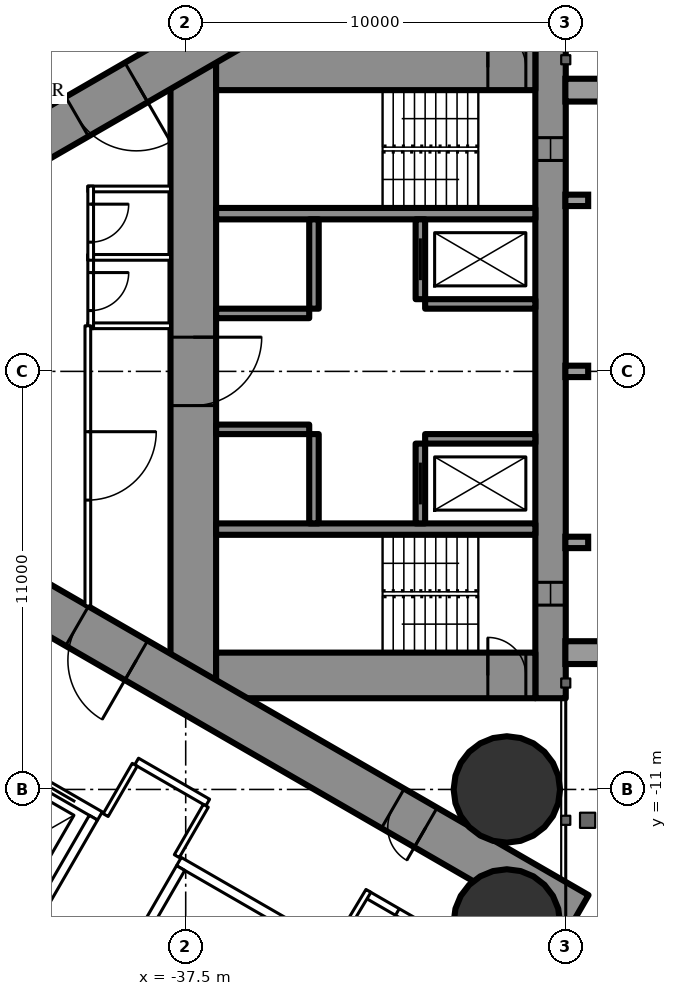
"""IFC4 building model, lengths in metres.
Left out: names, types, materials, properties, quantities, classifications, styles, units other than length and angle.
Written with IfcOpenShell. Run it as: python <this file> out.ifc"""

import sys

from ifc_helpers import new_model, si_unit, direction, frame, frame_2d, origin, origin_2d, place, context, subcontext, project, spatial, rectangle, circle, extrude, element, fill, save


model = new_model("IFC4")
c1 = context("Model", 3, precision=1e-05, world=origin(), true_north=direction((0.0, 1.0)))
c2 = subcontext(c1, "Body", "Model", "MODEL_VIEW")
j1 = project(units=[si_unit("LENGTHUNIT", "METRE"), si_unit("PLANEANGLEUNIT", "RADIAN")], contexts=[c1])
p1 = place(None, origin())
s1 = spatial("IfcSite", under=j1, at=p1, CompositionType="ELEMENT")
p2 = place(p1, origin())
s2 = spatial("IfcBuilding", under=s1, at=p2, CompositionType="ELEMENT")
p3 = place(p2, frame((0.0, 0.0, 159.8)))
s3 = spatial("IfcBuildingStorey", under=s2, at=p3, CompositionType="ELEMENT", Elevation=159.8)
for number, where, z_axis, x_axis in (
    (1, (-29.05, -11.0, 0.0), (0.0, 0.0, 1.0), (1.0, 0.0, 0.0)),
    (2, (-29.05, -14.5, 0.0), (0.0, 0.0, 1.0), (1.0, 0.0, 0.0)),
):
    element("IfcColumn", number, at=place(p3, frame(where, z_axis=z_axis, x_axis=x_axis)), inside=s3, PredefinedType="COLUMN", context=c2, shape_type="SweptSolid", body=[
        extrude(circle(Radius=1.4, at=origin_2d()), origin(), (0.0, 0.0, 1.0), 3.5),
    ])
p4 = place(p3, frame((-27.9, 8.6, 0.0), z_axis=(0.0, 0.0, 1.0), x_axis=(0.0, -1.0, 0.0)))
e3 = element("IfcWall", 3, at=p4, inside=s3, PredefinedType="SHEAR", context=c2, shape_type="SweptSolid", body=[
    extrude(rectangle(XDim=17.2, YDim=0.8, at=frame_2d((8.6, 0.0))), origin(), (0.0, 0.0, 1.0), 3.5),
])
p5 = place(p4, frame((2.45, 0.0, 0.6)))
e4 = element("IfcOpeningElement", 4, at=p5, cuts=e3, PredefinedType="OPENING", context=c2, shape_type="SweptSolid", body=[
    extrude(rectangle(XDim=0.6, YDim=2.1, at=frame_2d((0.3, 1.05))), frame((0.0, 0.41, 0.0), z_axis=(0.0, -1.0, 0.0), x_axis=(1.0, 0.0, 0.0)), (0.0, 0.0, 1.0), 0.82),
])
p6 = place(p4, frame((14.15, 0.0, 0.6)))
e5 = element("IfcOpeningElement", 5, at=p6, cuts=e3, PredefinedType="OPENING", context=c2, shape_type="SweptSolid", body=[
    extrude(rectangle(XDim=0.6, YDim=2.1, at=frame_2d((0.3, 1.05))), frame((0.0, 0.41, 0.0), z_axis=(0.0, -1.0, 0.0), x_axis=(1.0, 0.0, 0.0)), (0.0, 0.0, 1.0), 0.82),
])
p7 = place(p3, frame((-37.3, 8.6, 0.0), z_axis=(0.0, 0.0, 1.0), x_axis=(0.0, -1.0, 0.0)))
e6 = element("IfcWall", 6, at=p7, inside=s3, PredefinedType="SHEAR", context=c2, shape_type="SweptSolid", body=[
    extrude(rectangle(XDim=17.2, YDim=1.2, at=frame_2d((8.6, 0.0))), origin(), (0.0, 0.0, 1.0), 3.5),
])
p8 = place(p7, frame((7.7, 0.0, 0.0)))
e7 = element("IfcOpeningElement", 7, at=p8, cuts=e6, PredefinedType="OPENING", context=c2, shape_type="SweptSolid", body=[
    extrude(rectangle(XDim=1.8, YDim=2.2, at=frame_2d((0.9, 1.1))), frame((0.0, 0.61, 0.0), z_axis=(0.0, -1.0, 0.0), x_axis=(1.0, 0.0, 0.0)), (0.0, 0.0, 1.0), 1.22),
])
p9 = place(p3, frame((-28.3, 8.0, 0.0), z_axis=(0.0, 0.0, 1.0), x_axis=(-1.0, 0.0, 0.0)))
e8 = element("IfcWall", 8, at=p9, inside=s3, PredefinedType="SHEAR", context=c2, shape_type="SweptSolid", body=[
    extrude(rectangle(XDim=8.4, YDim=1.2, at=frame_2d((4.2, 0.0))), origin(), (0.0, 0.0, 1.0), 3.5),
])
p10 = place(p9, frame((0.25, 0.0, 0.0)))
e9 = element("IfcOpeningElement", 9, at=p10, cuts=e8, PredefinedType="OPENING", context=c2, shape_type="SweptSolid", body=[
    extrude(rectangle(XDim=1.0, YDim=2.2, at=frame_2d((0.5, 1.1))), frame((0.0, 0.61, 0.0), z_axis=(0.0, -1.0, 0.0), x_axis=(1.0, 0.0, 0.0)), (0.0, 0.0, 1.0), 1.22),
])
p11 = place(p3, frame((-28.3, -8.0, 0.0), z_axis=(0.0, 0.0, 1.0), x_axis=(-1.0, 0.0, 0.0)))
e10 = element("IfcWall", 10, at=p11, inside=s3, PredefinedType="SHEAR", context=c2, shape_type="SweptSolid", body=[
    extrude(rectangle(XDim=8.4, YDim=1.2, at=frame_2d((4.2, 0.0))), origin(), (0.0, 0.0, 1.0), 3.5),
])
p12 = place(p11, frame((0.25, 0.0, 0.0)))
e11 = element("IfcOpeningElement", 11, at=p12, cuts=e10, PredefinedType="OPENING", context=c2, shape_type="SweptSolid", body=[
    extrude(rectangle(XDim=1.0, YDim=2.2, at=frame_2d((0.5, 1.1))), frame((0.0, 0.61, 0.0), z_axis=(0.0, -1.0, 0.0), x_axis=(1.0, 0.0, 0.0)), (0.0, 0.0, 1.0), 1.22),
])
for number, where, z_axis, x_axis in (
    (12, (-28.3, 4.15, 0.0), (0.0, 0.0, 1.0), (-1.0, 0.0, 0.0)),
    (13, (-28.3, -4.15, 0.0), (0.0, 0.0, 1.0), (-1.0, 0.0, 0.0)),
):
    element("IfcWall", number, at=place(p3, frame(where, z_axis=z_axis, x_axis=x_axis)), inside=s3, PredefinedType="SHEAR", context=c2, shape_type="SweptSolid", body=[
        extrude(rectangle(XDim=8.4, YDim=0.3, at=frame_2d((4.2, 0.0))), origin(), (0.0, 0.0, 1.0), 3.5),
    ])
p13 = place(p3, frame((-31.325, 4.0, 0.0), z_axis=(0.0, 0.0, 1.0), x_axis=(0.0, -1.0, 0.0)))
e14 = element("IfcWall", 14, at=p13, inside=s3, PredefinedType="SHEAR", context=c2, shape_type="SweptSolid", body=[
    extrude(rectangle(XDim=2.1, YDim=0.25, at=frame_2d((1.05, 0.0))), origin(), (0.0, 0.0, 1.0), 3.5),
])
p14 = place(p13, frame((0.5, 0.0, 0.0)))
e15 = element("IfcOpeningElement", 15, at=p14, cuts=e14, PredefinedType="OPENING", context=c2, shape_type="SweptSolid", body=[
    extrude(rectangle(XDim=1.1, YDim=2.2, at=frame_2d((0.55, 1.1))), frame((0.0, 0.135, 0.0), z_axis=(0.0, -1.0, 0.0), x_axis=(1.0, 0.0, 0.0)), (0.0, 0.0, 1.0), 0.27),
])
p15 = place(p3, frame((-34.125, 4.0, 0.0), z_axis=(0.0, 0.0, 1.0), x_axis=(0.0, -1.0, 0.0)))
e16 = element("IfcWall", 16, at=p15, inside=s3, PredefinedType="SHEAR", context=c2, shape_type="SweptSolid", body=[
    extrude(rectangle(XDim=2.35, YDim=0.25, at=frame_2d((1.175, 0.0))), origin(), (0.0, 0.0, 1.0), 3.5),
])
p16 = place(p3, frame((-28.3, 1.775, 0.0), z_axis=(0.0, 0.0, 1.0), x_axis=(-1.0, 0.0, 0.0)))
e17 = element("IfcWall", 17, at=p16, inside=s3, PredefinedType="SHEAR", context=c2, shape_type="SweptSolid", body=[
    extrude(rectangle(XDim=2.9, YDim=0.25, at=frame_2d((1.45, 0.0))), origin(), (0.0, 0.0, 1.0), 3.5),
])
p17 = place(p3, frame((-34.25, 1.525, 0.0), z_axis=(0.0, 0.0, 1.0), x_axis=(-1.0, 0.0, 0.0)))
e18 = element("IfcWall", 18, at=p17, inside=s3, PredefinedType="SHEAR", context=c2, shape_type="SweptSolid", body=[
    extrude(rectangle(XDim=2.45, YDim=0.25, at=frame_2d((1.225, 0.0))), origin(), (0.0, 0.0, 1.0), 3.5),
])
p18 = place(p3, frame((-31.325, -1.9, 0.0), z_axis=(0.0, 0.0, 1.0), x_axis=(0.0, -1.0, 0.0)))
e19 = element("IfcWall", 19, at=p18, inside=s3, PredefinedType="SHEAR", context=c2, shape_type="SweptSolid", body=[
    extrude(rectangle(XDim=2.1, YDim=0.25, at=frame_2d((1.05, 0.0))), origin(), (0.0, 0.0, 1.0), 3.5),
])
p19 = place(p18, frame((0.5, 0.0, 0.0)))
e20 = element("IfcOpeningElement", 20, at=p19, cuts=e19, PredefinedType="OPENING", context=c2, shape_type="SweptSolid", body=[
    extrude(rectangle(XDim=1.1, YDim=2.2, at=frame_2d((0.55, 1.1))), frame((0.0, 0.135, 0.0), z_axis=(0.0, -1.0, 0.0), x_axis=(1.0, 0.0, 0.0)), (0.0, 0.0, 1.0), 0.27),
])
p20 = place(p3, frame((-34.125, -1.65, 0.0), z_axis=(0.0, 0.0, 1.0), x_axis=(0.0, -1.0, 0.0)))
e21 = element("IfcWall", 21, at=p20, inside=s3, PredefinedType="SHEAR", context=c2, shape_type="SweptSolid", body=[
    extrude(rectangle(XDim=2.35, YDim=0.25, at=frame_2d((1.175, 0.0))), origin(), (0.0, 0.0, 1.0), 3.5),
])
p21 = place(p3, frame((-28.3, -1.775, 0.0), z_axis=(0.0, 0.0, 1.0), x_axis=(-1.0, 0.0, 0.0)))
e22 = element("IfcWall", 22, at=p21, inside=s3, PredefinedType="SHEAR", context=c2, shape_type="SweptSolid", body=[
    extrude(rectangle(XDim=2.9, YDim=0.25, at=frame_2d((1.45, 0.0))), origin(), (0.0, 0.0, 1.0), 3.5),
])
p22 = place(p3, frame((-34.25, -1.525, 0.0), z_axis=(0.0, 0.0, 1.0), x_axis=(-1.0, 0.0, 0.0)))
e23 = element("IfcWall", 23, at=p22, inside=s3, PredefinedType="SHEAR", context=c2, shape_type="SweptSolid", body=[
    extrude(rectangle(XDim=2.45, YDim=0.25, at=frame_2d((1.225, 0.0))), origin(), (0.0, 0.0, 1.0), 3.5),
])
p23 = place(p3, frame((-27.2, 14.3, 0.0), z_axis=(0.0, 0.0, 1.0), x_axis=(-0.866026593062, -0.499997940104, 0.0)))
e24 = element("IfcWall", 24, at=p23, inside=s3, PredefinedType="SHEAR", context=c2, shape_type="SweptSolid", body=[
    extrude(rectangle(XDim=28.946, YDim=1.2, at=frame_2d((14.473, 0.0))), origin(), (0.0, 0.0, 1.0), 3.5),
])
p24 = place(p23, frame((4.6, 0.0, 0.0)))
e25 = element("IfcOpeningElement", 25, at=p24, cuts=e24, PredefinedType="OPENING", context=c2, shape_type="SweptSolid", body=[
    extrude(rectangle(XDim=1.0, YDim=2.2, at=frame_2d((0.5, 1.1))), frame((0.0, 0.61, 0.0), z_axis=(0.0, -1.0, 0.0), x_axis=(1.0, 0.0, 0.0)), (0.0, 0.0, 1.0), 1.22),
])
p25 = place(p23, frame((13.395, 0.0, 0.0)))
e26 = element("IfcOpeningElement", 26, at=p25, cuts=e24, PredefinedType="OPENING", context=c2, shape_type="SweptSolid", body=[
    extrude(rectangle(XDim=1.8, YDim=2.2, at=frame_2d((0.9, 1.1))), frame((0.0, 0.61, 0.0), z_axis=(0.0, -1.0, 0.0), x_axis=(1.0, 0.0, 0.0)), (0.0, 0.0, 1.0), 1.22),
])
p26 = place(p3, frame((-27.2, -14.3, 0.0), z_axis=(0.0, 0.0, 1.0), x_axis=(-0.866024021859, 0.500002393557, 0.0)))
e27 = element("IfcWall", 27, at=p26, inside=s3, PredefinedType="SHEAR", context=c2, shape_type="SweptSolid", body=[
    extrude(rectangle(XDim=27.907, YDim=1.2, at=frame_2d((13.954, 0.0))), origin(), (0.0, 0.0, 1.0), 3.5),
])
p27 = place(p26, frame((4.6, 0.0, 0.0)))
e28 = element("IfcOpeningElement", 28, at=p27, cuts=e27, PredefinedType="OPENING", context=c2, shape_type="SweptSolid", body=[
    extrude(rectangle(XDim=1.0, YDim=2.2, at=frame_2d((0.5, 1.1))), frame((0.0, 0.61, 0.0), z_axis=(0.0, -1.0, 0.0), x_axis=(1.0, 0.0, 0.0)), (0.0, 0.0, 1.0), 1.22),
])
p28 = place(p26, frame((13.395, 0.0, 0.0)))
e29 = element("IfcOpeningElement", 29, at=p28, cuts=e27, PredefinedType="OPENING", context=c2, shape_type="SweptSolid", body=[
    extrude(rectangle(XDim=1.8, YDim=2.2, at=frame_2d((0.9, 1.1))), frame((0.0, 0.61, 0.0), z_axis=(0.0, -1.0, 0.0), x_axis=(1.0, 0.0, 0.0)), (0.0, 0.0, 1.0), 1.22),
])
p29 = place(p3, frame((-27.86, -16.575, 0.0), z_axis=(0.0, 0.0, 1.0), x_axis=(-0.866019269751, 0.500010624307, 0.0)))
e30 = element("IfcWall", 30, at=p29, inside=s3, PredefinedType="PARTITIONING", context=c2, shape_type="SweptSolid", body=[
    extrude(rectangle(XDim=5.623, YDim=0.2, at=frame_2d((2.811, 0.0))), origin(), (0.0, 0.0, 1.0), 3.25),
])
p30 = place(p29, frame((3.75, 0.0, 0.0)))
e31 = element("IfcOpeningElement", 31, at=p30, cuts=e30, PredefinedType="OPENING", context=c2, shape_type="SweptSolid", body=[
    extrude(rectangle(XDim=0.95, YDim=2.2, at=frame_2d((0.475, 1.1))), frame((0.0, 0.11, 0.0), z_axis=(0.0, -1.0, 0.0), x_axis=(1.0, 0.0, 0.0)), (0.0, 0.0, 1.0), 0.22),
])
p31 = place(p3, frame((-36.92, -11.344, 0.0), z_axis=(0.0, 0.0, 1.0), x_axis=(-0.866065156741, 0.499931139538, 0.0)))
e32 = element("IfcWall", 32, at=p31, inside=s3, PredefinedType="PARTITIONING", context=c2, shape_type="SweptSolid", body=[
    extrude(rectangle(XDim=2.16, YDim=0.2, at=frame_2d((1.08, 0.0))), origin(), (0.0, 0.0, 1.0), 3.25),
])
p32 = place(p3, frame((-33.621, -15.218, 0.0), z_axis=(0.0, 0.0, 1.0), x_axis=(0.514336634837, 0.857588377991, 0.0)))
e33 = element("IfcWall", 33, at=p32, inside=s3, PredefinedType="PARTITIONING", context=c2, shape_type="SweptSolid", body=[
    extrude(rectangle(XDim=1.805, YDim=0.15, at=frame_2d((0.903, 0.0))), origin(), (0.0, 0.0, 1.0), 3.25),
])
p33 = place(p3, frame((-36.97, -11.43, 0.0), z_axis=(0.0, 0.0, 1.0), x_axis=(-0.499985008713, -0.866034058835, 0.0)))
e34 = element("IfcWall", 34, at=p33, inside=s3, PredefinedType="PARTITIONING", context=c2, shape_type="SweptSolid", body=[
    extrude(rectangle(XDim=1.529, YDim=0.15, at=frame_2d((0.765, 0.0))), origin(), (0.0, 0.0, 1.0), 3.25),
])
p34 = place(p3, frame((-38.841, -10.35, 0.0), z_axis=(0.0, 0.0, 1.0), x_axis=(-0.499966498333, -0.866044745117, 0.0)))
e35 = element("IfcWall", 35, at=p34, inside=s3, PredefinedType="PARTITIONING", context=c2, shape_type="SweptSolid", body=[
    extrude(rectangle(XDim=1.53, YDim=0.15, at=frame_2d((0.765, 0.0))), origin(), (0.0, 0.0, 1.0), 3.25),
])
for number, where, z_axis, x_axis in (
    (36, (-37.9, 1.2, 0.0), (0.0, 0.0, 1.0), (-1.0, 0.0, 0.0)),
    (37, (-37.9, 3.0, 0.0), (0.0, 0.0, 1.0), (-1.0, 0.0, 0.0)),
    (38, (-37.9, 4.8, 0.0), (0.0, 0.0, 1.0), (-1.0, 0.0, 0.0)),
):
    element("IfcWall", number, at=place(p3, frame(where, z_axis=z_axis, x_axis=x_axis)), inside=s3, PredefinedType="PARTITIONING", context=c2, shape_type="SweptSolid", body=[
        extrude(rectangle(XDim=2.175, YDim=0.15, at=frame_2d((1.087, 0.0))), origin(), (0.0, 0.0, 1.0), 3.25),
    ])
p35 = place(p3, frame((-40.0, 3.075, 0.0), z_axis=(0.0, 0.0, 1.0), x_axis=(0.0, -1.0, 0.0)))
e39 = element("IfcWall", 39, at=p35, inside=s3, PredefinedType="PARTITIONING", context=c2, shape_type="SweptSolid", body=[
    extrude(rectangle(XDim=1.95, YDim=0.15, at=frame_2d((0.975, 0.0))), origin(), (0.0, 0.0, 1.0), 3.25),
])
p36 = place(p35, frame((0.475, 0.0, 0.0)))
e40 = element("IfcOpeningElement", 40, at=p36, cuts=e39, PredefinedType="OPENING", context=c2, shape_type="SweptSolid", body=[
    extrude(rectangle(XDim=1.0, YDim=2.2, at=frame_2d((0.5, 1.1))), frame((0.0, 0.085, 0.0), z_axis=(0.0, -1.0, 0.0), x_axis=(1.0, 0.0, 0.0)), (0.0, 0.0, 1.0), 0.17),
])
p37 = place(p3, frame((-40.0, 4.875, 0.0), z_axis=(0.0, 0.0, 1.0), x_axis=(0.0, -1.0, 0.0)))
e41 = element("IfcWall", 41, at=p37, inside=s3, PredefinedType="PARTITIONING", context=c2, shape_type="SweptSolid", body=[
    extrude(rectangle(XDim=1.95, YDim=0.15, at=frame_2d((0.975, 0.0))), origin(), (0.0, 0.0, 1.0), 3.25),
])
p38 = place(p37, frame((0.475, 0.0, 0.0)))
e42 = element("IfcOpeningElement", 42, at=p38, cuts=e41, PredefinedType="OPENING", context=c2, shape_type="SweptSolid", body=[
    extrude(rectangle(XDim=1.0, YDim=2.2, at=frame_2d((0.5, 1.1))), frame((0.0, 0.085, 0.0), z_axis=(0.0, -1.0, 0.0), x_axis=(1.0, 0.0, 0.0)), (0.0, 0.0, 1.0), 0.17),
])
p39 = place(p3, frame((-40.075, 1.2, 0.0), z_axis=(0.0, 0.0, 1.0), x_axis=(0.0, -1.0, 0.0)))
e43 = element("IfcWall", 43, at=p39, inside=s3, PredefinedType="PARTITIONING", context=c2, shape_type="SweptSolid", body=[
    extrude(rectangle(XDim=7.374, YDim=0.15, at=frame_2d((3.687, 0.0))), origin(), (0.0, 0.0, 1.0), 3.25),
])
p40 = place(p39, frame((2.787, 0.0, 0.0)))
e44 = element("IfcOpeningElement", 44, at=p40, cuts=e43, PredefinedType="OPENING", context=c2, shape_type="SweptSolid", body=[
    extrude(rectangle(XDim=1.8, YDim=2.2, at=frame_2d((0.9, 1.1))), frame((0.0, 0.085, 0.0), z_axis=(0.0, -1.0, 0.0), x_axis=(1.0, 0.0, 0.0)), (0.0, 0.0, 1.0), 0.17),
])
p41 = place(p3, frame((-33.696, -15.197, 0.0), z_axis=(0.0, 0.0, 1.0), x_axis=(-0.865976953817, 0.500083908417, 0.0)))
e45 = element("IfcWall", 45, at=p41, inside=s3, PredefinedType="PARTITIONING", context=c2, shape_type="SweptSolid", body=[
    extrude(rectangle(XDim=4.599, YDim=0.25, at=frame_2d((2.3, 0.0))), origin(), (0.0, 0.0, 1.0), 3.25),
])
p42 = place(p3, frame((-37.633, -13.068, 0.0), z_axis=(0.0, 0.0, 1.0), x_axis=(-0.499872130319, -0.866099216793, 0.0)))
e46 = element("IfcWall", 46, at=p42, inside=s3, PredefinedType="PARTITIONING", context=c2, shape_type="SweptSolid", body=[
    extrude(rectangle(XDim=3.2, YDim=0.25, at=frame_2d((1.6, 0.0))), origin(), (0.0, 0.0, 1.0), 3.25),
])
p43 = place(p3, frame((-39.758, -11.697, 0.0), z_axis=(0.0, 0.0, 1.0), x_axis=(-0.866024194504, 0.500002094529, 0.0)))
e47 = element("IfcWall", 47, at=p43, inside=s3, PredefinedType="PARTITIONING", context=c2, shape_type="SweptSolid", body=[
    extrude(rectangle(XDim=6.6, YDim=0.25, at=frame_2d((3.3, 0.0))), origin(), (0.0, 0.0, 1.0), 3.25),
])
p44 = place(p43, frame((0.75, 0.0, 0.0)))
e48 = element("IfcOpeningElement", 48, at=p44, cuts=e47, PredefinedType="OPENING", context=c2, shape_type="SweptSolid", body=[
    extrude(rectangle(XDim=1.1, YDim=2.2, at=frame_2d((0.55, 1.1))), frame((0.0, 0.135, 0.0), z_axis=(0.0, -1.0, 0.0), x_axis=(1.0, 0.0, 0.0)), (0.0, 0.0, 1.0), 0.27),
])
p45 = place(p43, frame((2.75, 0.0, 0.0)))
e49 = element("IfcOpeningElement", 49, at=p45, cuts=e47, PredefinedType="OPENING", context=c2, shape_type="SweptSolid", body=[
    extrude(rectangle(XDim=1.1, YDim=2.2, at=frame_2d((0.55, 1.1))), frame((0.0, 0.135, 0.0), z_axis=(0.0, -1.0, 0.0), x_axis=(1.0, 0.0, 0.0)), (0.0, 0.0, 1.0), 0.27),
])
p46 = place(p43, frame((4.75, 0.0, 0.0)))
e50 = element("IfcOpeningElement", 50, at=p46, cuts=e47, PredefinedType="OPENING", context=c2, shape_type="SweptSolid", body=[
    extrude(rectangle(XDim=1.1, YDim=2.2, at=frame_2d((0.55, 1.1))), frame((0.0, 0.135, 0.0), z_axis=(0.0, -1.0, 0.0), x_axis=(1.0, 0.0, 0.0)), (0.0, 0.0, 1.0), 0.27),
])
p47 = place(p3, frame((-39.928, -11.743, 0.0), z_axis=(0.0, 0.0, 1.0), x_axis=(-0.499929347863, -0.866066190972, 0.0)))
e51 = element("IfcWall", 51, at=p47, inside=s3, PredefinedType="PARTITIONING", context=c2, shape_type="SweptSolid", body=[
    extrude(rectangle(XDim=3.201, YDim=0.25, at=frame_2d((1.6, 0.0))), origin(), (0.0, 0.0, 1.0), 3.25),
])
p48 = place(p30, origin())
e52 = element("IfcDoor", 52, at=p48, inside=s3, OperationType="SINGLE_SWING_LEFT", PredefinedType="DOOR", context=c2, shape_type="SweptSolid", body=[
    extrude(rectangle(XDim=0.95, YDim=2.2, at=frame_2d((0.475, 1.1))), frame((0.0, 0.025, 0.0), z_axis=(0.0, -1.0, 0.0), x_axis=(1.0, 0.0, 0.0)), (0.0, 0.0, 1.0), 0.05),
])
fill(e31, e52)
p49 = place(p36, origin())
e53 = element("IfcDoor", 53, at=p49, inside=s3, OperationType="SINGLE_SWING_LEFT", PredefinedType="DOOR", context=c2, shape_type="SweptSolid", body=[
    extrude(rectangle(XDim=1.0, YDim=2.2, at=frame_2d((0.5, 1.1))), frame((0.0, 0.025, 0.0), z_axis=(0.0, -1.0, 0.0), x_axis=(1.0, 0.0, 0.0)), (0.0, 0.0, 1.0), 0.05),
])
fill(e40, e53)
p50 = place(p38, origin())
e54 = element("IfcDoor", 54, at=p50, inside=s3, OperationType="SINGLE_SWING_LEFT", PredefinedType="DOOR", context=c2, shape_type="SweptSolid", body=[
    extrude(rectangle(XDim=1.0, YDim=2.2, at=frame_2d((0.5, 1.1))), frame((0.0, 0.025, 0.0), z_axis=(0.0, -1.0, 0.0), x_axis=(1.0, 0.0, 0.0)), (0.0, 0.0, 1.0), 0.05),
])
fill(e42, e54)
p51 = place(p40, origin())
e55 = element("IfcDoor", 55, at=p51, inside=s3, OperationType="DOUBLE_DOOR_SINGLE_SWING", PredefinedType="DOOR", context=c2, shape_type="SweptSolid", body=[
    extrude(rectangle(XDim=1.8, YDim=2.2, at=frame_2d((0.9, 1.1))), frame((0.0, 0.025, 0.0), z_axis=(0.0, -1.0, 0.0), x_axis=(1.0, 0.0, 0.0)), (0.0, 0.0, 1.0), 0.05),
])
fill(e44, e55)
p52 = place(p25, origin())
e56 = element("IfcDoor", 56, at=p52, inside=s3, OperationType="DOUBLE_DOOR_SINGLE_SWING", PredefinedType="DOOR", context=c2, shape_type="SweptSolid", body=[
    extrude(rectangle(XDim=1.8, YDim=2.2, at=frame_2d((0.9, 1.1))), frame((0.0, 0.025, 0.0), z_axis=(0.0, -1.0, 0.0), x_axis=(1.0, 0.0, 0.0)), (0.0, 0.0, 1.0), 0.05),
])
fill(e26, e56)
p53 = place(p27, origin())
e57 = element("IfcDoor", 57, at=p53, inside=s3, OperationType="SINGLE_SWING_LEFT", PredefinedType="DOOR", context=c2, shape_type="SweptSolid", body=[
    extrude(rectangle(XDim=1.0, YDim=2.2, at=frame_2d((0.5, 1.1))), frame((0.0, 0.025, 0.0), z_axis=(0.0, -1.0, 0.0), x_axis=(1.0, 0.0, 0.0)), (0.0, 0.0, 1.0), 0.05),
])
fill(e28, e57)
p54 = place(p28, origin())
e58 = element("IfcDoor", 58, at=p54, inside=s3, OperationType="DOUBLE_DOOR_SINGLE_SWING", PredefinedType="DOOR", context=c2, shape_type="SweptSolid", body=[
    extrude(rectangle(XDim=1.8, YDim=2.2, at=frame_2d((0.9, 1.1))), frame((0.0, 0.025, 0.0), z_axis=(0.0, -1.0, 0.0), x_axis=(1.0, 0.0, 0.0)), (0.0, 0.0, 1.0), 0.05),
])
fill(e29, e58)
p55 = place(p8, origin())
e59 = element("IfcDoor", 59, at=p55, inside=s3, OperationType="DOUBLE_DOOR_SINGLE_SWING", PredefinedType="DOOR", context=c2, shape_type="SweptSolid", body=[
    extrude(rectangle(XDim=1.8, YDim=2.2, at=frame_2d((0.9, 1.1))), frame((0.0, 0.025, 0.0), z_axis=(0.0, -1.0, 0.0), x_axis=(1.0, 0.0, 0.0)), (0.0, 0.0, 1.0), 0.05),
])
fill(e7, e59)
p56 = place(p10, origin())
e60 = element("IfcDoor", 60, at=p56, inside=s3, OperationType="SINGLE_SWING_RIGHT", PredefinedType="DOOR", context=c2, shape_type="SweptSolid", body=[
    extrude(rectangle(XDim=1.0, YDim=2.2, at=frame_2d((0.5, 1.1))), frame((0.0, 0.025, 0.0), z_axis=(0.0, -1.0, 0.0), x_axis=(1.0, 0.0, 0.0)), (0.0, 0.0, 1.0), 0.05),
])
fill(e9, e60)
p57 = place(p12, origin())
e61 = element("IfcDoor", 61, at=p57, inside=s3, OperationType="SINGLE_SWING_RIGHT", PredefinedType="DOOR", context=c2, shape_type="SweptSolid", body=[
    extrude(rectangle(XDim=1.0, YDim=2.2, at=frame_2d((0.5, 1.1))), frame((0.0, 0.025, 0.0), z_axis=(0.0, -1.0, 0.0), x_axis=(1.0, 0.0, 0.0)), (0.0, 0.0, 1.0), 0.05),
])
fill(e11, e61)
p58 = place(p14, origin())
e62 = element("IfcDoor", 62, at=p58, inside=s3, OperationType="SLIDING_TO_LEFT", PredefinedType="USERDEFINED", context=c2, shape_type="SweptSolid", body=[
    extrude(rectangle(XDim=1.1, YDim=2.2, at=frame_2d((0.55, 1.1))), frame((0.0, 0.025, 0.0), z_axis=(0.0, -1.0, 0.0), x_axis=(1.0, 0.0, 0.0)), (0.0, 0.0, 1.0), 0.05),
])
fill(e15, e62)
p59 = place(p19, origin())
e63 = element("IfcDoor", 63, at=p59, inside=s3, OperationType="SLIDING_TO_LEFT", PredefinedType="USERDEFINED", context=c2, shape_type="SweptSolid", body=[
    extrude(rectangle(XDim=1.1, YDim=2.2, at=frame_2d((0.55, 1.1))), frame((0.0, 0.025, 0.0), z_axis=(0.0, -1.0, 0.0), x_axis=(1.0, 0.0, 0.0)), (0.0, 0.0, 1.0), 0.05),
])
fill(e20, e63)
p60 = place(p44, origin())
e64 = element("IfcDoor", 64, at=p60, inside=s3, OperationType="DOUBLE_DOOR_SLIDING", PredefinedType="USERDEFINED", context=c2, shape_type="SweptSolid", body=[
    extrude(rectangle(XDim=1.1, YDim=2.2, at=frame_2d((0.55, 1.1))), frame((0.0, 0.025, 0.0), z_axis=(0.0, -1.0, 0.0), x_axis=(1.0, 0.0, 0.0)), (0.0, 0.0, 1.0), 0.05),
])
fill(e48, e64)
p61 = place(p5, origin())
e65 = element("IfcWindow", 65, at=p61, inside=s3, PartitioningType="SINGLE_PANEL", PredefinedType="WINDOW", context=c2, shape_type="SweptSolid", body=[
    extrude(rectangle(XDim=0.6, YDim=2.1, at=frame_2d((0.3, 1.05))), frame((0.0, 0.03, 0.0), z_axis=(0.0, -1.0, 0.0), x_axis=(1.0, 0.0, 0.0)), (0.0, 0.0, 1.0), 0.06),
])
fill(e4, e65)
p62 = place(p6, origin())
e66 = element("IfcWindow", 66, at=p62, inside=s3, PartitioningType="SINGLE_PANEL", PredefinedType="WINDOW", context=c2, shape_type="SweptSolid", body=[
    extrude(rectangle(XDim=0.6, YDim=2.1, at=frame_2d((0.3, 1.05))), frame((0.0, 0.03, 0.0), z_axis=(0.0, -1.0, 0.0), x_axis=(1.0, 0.0, 0.0)), (0.0, 0.0, 1.0), 0.06),
])
fill(e5, e66)
save(model, sys.argv[1])
